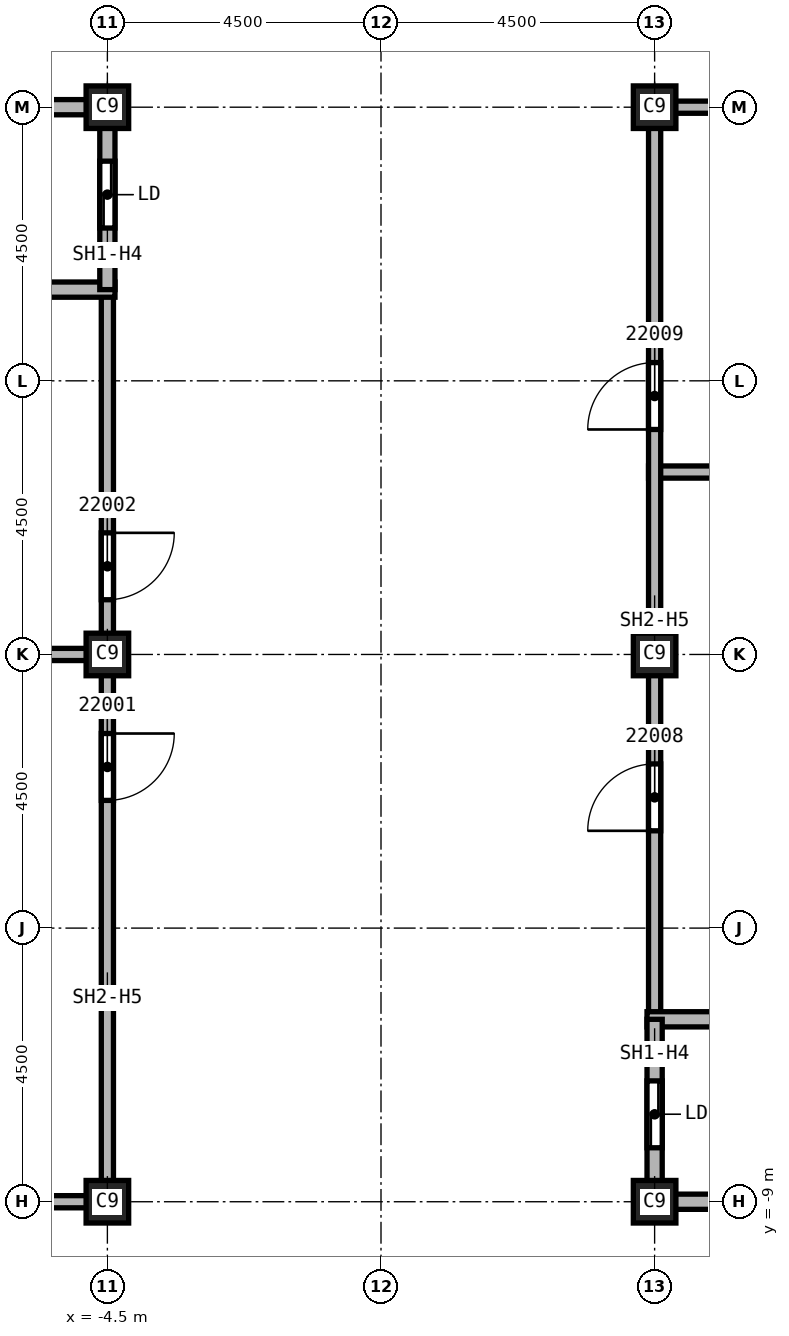
"""IFC4 building model, lengths in metres.
Left out: names, types, materials, properties, quantities, classifications, styles, units other than length and angle.
Written with IfcOpenShell. Run it as: python <this file> out.ifc"""

import sys

from ifc_helpers import new_model, si_unit, direction, frame, frame_2d, origin, origin_2d, place, context, subcontext, project, spatial, rectangle, extrude, element, fill, save


model = new_model("IFC4")
c1 = context("Model", 3, precision=1e-05, world=origin(), true_north=direction((0.0, 1.0)))
c2 = subcontext(c1, "Body", "Model", "MODEL_VIEW")
j1 = project(units=[si_unit("LENGTHUNIT", "METRE"), si_unit("PLANEANGLEUNIT", "RADIAN")], contexts=[c1])
p1 = place(None, origin())
s1 = spatial("IfcSite", under=j1, at=p1, CompositionType="ELEMENT")
p2 = place(p1, origin())
s2 = spatial("IfcBuilding", under=s1, at=p2, CompositionType="ELEMENT")
p3 = place(p2, frame((0.0, 0.0, 316.0)))
s3 = spatial("IfcBuildingStorey", under=s2, at=p3, CompositionType="ELEMENT", Elevation=316.0)
for number, where, z_axis, x_axis in (
    (1, (4.5, 0.0, 0.0), (0.0, 0.0, 1.0), (1.0, 0.0, 0.0)),
    (2, (4.5, 9.0, 0.0), (0.0, 0.0, 1.0), (1.0, 0.0, 0.0)),
    (3, (4.5, -9.0, 0.0), (0.0, 0.0, 1.0), (1.0, 0.0, 0.0)),
    (4, (-4.5, 0.0, 0.0), (0.0, 0.0, 1.0), (1.0, 0.0, 0.0)),
    (5, (-4.5, 9.0, 0.0), (0.0, 0.0, 1.0), (1.0, 0.0, 0.0)),
    (6, (-4.5, -9.0, 0.0), (0.0, 0.0, 1.0), (1.0, 0.0, 0.0)),
):
    element("IfcColumn", number, at=place(p3, frame(where, z_axis=z_axis, x_axis=x_axis)), inside=s3, PredefinedType="COLUMN", context=c2, shape_type="SweptSolid", body=[
        extrude(rectangle(XDim=0.7, YDim=0.7, at=origin_2d()), origin(), (0.0, 0.0, 1.0), 3.59),
    ])
p4 = place(p3, frame((-7.625, 0.0, 0.0), z_axis=(0.0, 0.0, 1.0), x_axis=(1.0, 0.0, 0.0)))
e7 = element("IfcWall", 7, at=p4, inside=s3, PredefinedType="SOLIDWALL", context=c2, shape_type="SweptSolid", body=[
    extrude(rectangle(XDim=3.225, YDim=0.2, at=frame_2d((1.613, 0.0))), origin(), (0.0, 0.0, 1.0), 3.59),
])
p5 = place(p3, frame((-4.5, -9.0, 0.0), z_axis=(0.0, 0.0, 1.0), x_axis=(-1.0, 0.0, 0.0)))
e8 = element("IfcWall", 8, at=p5, inside=s3, PredefinedType="SOLIDWALL", context=c2, shape_type="SweptSolid", body=[
    extrude(rectangle(XDim=3.0, YDim=0.2, at=frame_2d((1.5, 0.0))), origin(), (0.0, 0.0, 1.0), 2.828),
])
p6 = place(p3, frame((-4.5, 6.0, 0.0), z_axis=(0.0, 0.0, 1.0), x_axis=(0.0, -1.0, 0.0)))
e9 = element("IfcWall", 9, at=p6, inside=s3, PredefinedType="SOLIDWALL", context=c2, shape_type="SweptSolid", body=[
    extrude(rectangle(XDim=15.1, YDim=0.2, at=frame_2d((7.55, 0.0))), origin(), (0.0, 0.0, 1.0), 2.828),
])
p7 = place(p6, frame((7.3, 0.0, 0.0)))
e10 = element("IfcOpeningElement", 10, at=p7, cuts=e9, PredefinedType="OPENING", context=c2, shape_type="SweptSolid", body=[
    extrude(rectangle(XDim=1.1, YDim=2.1, at=frame_2d((0.55, 1.05))), frame((0.0, 0.1, 0.0), z_axis=(0.0, -1.0, 0.0), x_axis=(1.0, 0.0, 0.0)), (0.0, 0.0, 1.0), 0.2),
])
p8 = place(p6, frame((4.0, 0.0, 0.0)))
e11 = element("IfcOpeningElement", 11, at=p8, cuts=e9, PredefinedType="OPENING", context=c2, shape_type="SweptSolid", body=[
    extrude(rectangle(XDim=1.1, YDim=2.1, at=frame_2d((0.55, 1.05))), frame((0.0, 0.1, 0.0), z_axis=(0.0, -1.0, 0.0), x_axis=(1.0, 0.0, 0.0)), (0.0, 0.0, 1.0), 0.2),
])
p9 = place(p3, frame((4.4, 3.0, 0.0), z_axis=(0.0, 0.0, 1.0), x_axis=(1.0, 0.0, 0.0)))
e12 = element("IfcWall", 12, at=p9, inside=s3, PredefinedType="SOLIDWALL", context=c2, shape_type="SweptSolid", body=[
    extrude(rectangle(XDim=3.225, YDim=0.2, at=frame_2d((1.613, 0.0))), origin(), (0.0, 0.0, 1.0), 3.59),
])
p10 = place(p3, frame((4.5, -6.0, 0.0), z_axis=(0.0, 0.0, 1.0), x_axis=(0.0, 1.0, 0.0)))
e13 = element("IfcWall", 13, at=p10, inside=s3, PredefinedType="SOLIDWALL", context=c2, shape_type="SweptSolid", body=[
    extrude(rectangle(XDim=15.1, YDim=0.2, at=frame_2d((7.55, 0.0))), origin(), (0.0, 0.0, 1.0), 2.828),
])
p11 = place(p10, frame((3.1, 0.0, 0.0)))
e14 = element("IfcOpeningElement", 14, at=p11, cuts=e13, PredefinedType="OPENING", context=c2, shape_type="SweptSolid", body=[
    extrude(rectangle(XDim=1.1, YDim=2.1, at=frame_2d((0.55, 1.05))), frame((0.0, 0.1, 0.0), z_axis=(0.0, -1.0, 0.0), x_axis=(1.0, 0.0, 0.0)), (0.0, 0.0, 1.0), 0.2),
])
p12 = place(p10, frame((9.7, 0.0, 0.0)))
e15 = element("IfcOpeningElement", 15, at=p12, cuts=e13, PredefinedType="OPENING", context=c2, shape_type="SweptSolid", body=[
    extrude(rectangle(XDim=1.1, YDim=2.1, at=frame_2d((0.55, 1.05))), frame((0.0, 0.1, 0.0), z_axis=(0.0, -1.0, 0.0), x_axis=(1.0, 0.0, 0.0)), (0.0, 0.0, 1.0), 0.2),
])
p13 = place(p3, frame((4.5, 9.0, 0.0), z_axis=(0.0, 0.0, 1.0), x_axis=(1.0, 0.0, 0.0)))
e16 = element("IfcWall", 16, at=p13, inside=s3, PredefinedType="SOLIDWALL", context=c2, shape_type="SweptSolid", body=[
    extrude(rectangle(XDim=3.0, YDim=0.2, at=frame_2d((1.5, 0.0))), origin(), (0.0, 0.0, 1.0), 2.828),
])
p14 = place(p3, frame((-7.625, 6.0, 0.0), z_axis=(0.0, 0.0, 1.0), x_axis=(1.0, 0.0, 0.0)))
e17 = element("IfcWall", 17, at=p14, inside=s3, PredefinedType="SOLIDWALL", context=c2, shape_type="SweptSolid", body=[
    extrude(rectangle(XDim=3.25, YDim=0.25, at=frame_2d((1.625, 0.0))), origin(), (0.0, 0.0, 1.0), 3.59),
])
p15 = place(p3, frame((-7.5, 9.0, 0.0), z_axis=(0.0, 0.0, 1.0), x_axis=(1.0, 0.0, 0.0)))
e18 = element("IfcWall", 18, at=p15, inside=s3, PredefinedType="SOLIDWALL", context=c2, shape_type="SweptSolid", body=[
    extrude(rectangle(XDim=3.0, YDim=0.25, at=frame_2d((1.5, 0.0))), origin(), (0.0, 0.0, 1.0), 2.828),
])
p16 = place(p3, frame((-4.5, 9.125, 0.0), z_axis=(0.0, 0.0, 1.0), x_axis=(0.0, -1.0, 0.0)))
e19 = element("IfcWall", 19, at=p16, inside=s3, PredefinedType="SOLIDWALL", context=c2, shape_type="SweptSolid", body=[
    extrude(rectangle(XDim=3.125, YDim=0.25, at=frame_2d((1.562, 0.0))), origin(), (0.0, 0.0, 1.0), 2.828),
])
p17 = place(p16, frame((1.012, 0.0, 0.0)))
e20 = element("IfcOpeningElement", 20, at=p17, cuts=e19, PredefinedType="OPENING", context=c2, shape_type="SweptSolid", body=[
    extrude(rectangle(XDim=1.1, YDim=2.1, at=frame_2d((0.55, 1.05))), frame((0.0, 0.125, 0.0), z_axis=(0.0, -1.0, 0.0), x_axis=(1.0, 0.0, 0.0)), (0.0, 0.0, 1.0), 0.25),
])
p18 = place(p3, frame((4.375, -6.0, 0.0), z_axis=(0.0, 0.0, 1.0), x_axis=(1.0, 0.0, 0.0)))
e21 = element("IfcWall", 21, at=p18, inside=s3, PredefinedType="SOLIDWALL", context=c2, shape_type="SweptSolid", body=[
    extrude(rectangle(XDim=3.25, YDim=0.25, at=frame_2d((1.625, 0.0))), origin(), (0.0, 0.0, 1.0), 3.59),
])
p19 = place(p3, frame((4.5, -9.125, 0.0), z_axis=(0.0, 0.0, 1.0), x_axis=(0.0, 1.0, 0.0)))
e22 = element("IfcWall", 22, at=p19, inside=s3, PredefinedType="SOLIDWALL", context=c2, shape_type="SweptSolid", body=[
    extrude(rectangle(XDim=3.125, YDim=0.25, at=frame_2d((1.562, 0.0))), origin(), (0.0, 0.0, 1.0), 2.828),
])
p20 = place(p19, frame((1.012, 0.0, 0.0)))
e23 = element("IfcOpeningElement", 23, at=p20, cuts=e22, PredefinedType="OPENING", context=c2, shape_type="SweptSolid", body=[
    extrude(rectangle(XDim=1.1, YDim=2.1, at=frame_2d((0.55, 1.05))), frame((0.0, 0.125, 0.0), z_axis=(0.0, -1.0, 0.0), x_axis=(1.0, 0.0, 0.0)), (0.0, 0.0, 1.0), 0.25),
])
p21 = place(p3, frame((7.5, -9.0, 0.0), z_axis=(0.0, 0.0, 1.0), x_axis=(-1.0, 0.0, 0.0)))
e24 = element("IfcWall", 24, at=p21, inside=s3, PredefinedType="SOLIDWALL", context=c2, shape_type="SweptSolid", body=[
    extrude(rectangle(XDim=3.0, YDim=0.25, at=frame_2d((1.5, 0.0))), origin(), (0.0, 0.0, 1.0), 2.828),
])
p22 = place(p7, origin())
e25 = element("IfcDoor", 25, at=p22, inside=s3, OperationType="SINGLE_SWING_RIGHT", PredefinedType="DOOR", context=c2, shape_type="SweptSolid", body=[
    extrude(rectangle(XDim=1.1, YDim=2.1, at=frame_2d((0.55, 1.05))), frame((0.0, 0.025, 0.0), z_axis=(0.0, -1.0, 0.0), x_axis=(1.0, 0.0, 0.0)), (0.0, 0.0, 1.0), 0.05),
])
fill(e10, e25)
p23 = place(p8, origin())
e26 = element("IfcDoor", 26, at=p23, inside=s3, OperationType="SINGLE_SWING_LEFT", PredefinedType="DOOR", context=c2, shape_type="SweptSolid", body=[
    extrude(rectangle(XDim=1.1, YDim=2.1, at=frame_2d((0.55, 1.05))), frame((0.0, 0.025, 0.0), z_axis=(0.0, -1.0, 0.0), x_axis=(1.0, 0.0, 0.0)), (0.0, 0.0, 1.0), 0.05),
])
fill(e11, e26)
p24 = place(p11, origin())
e27 = element("IfcDoor", 27, at=p24, inside=s3, OperationType="SINGLE_SWING_LEFT", PredefinedType="DOOR", context=c2, shape_type="SweptSolid", body=[
    extrude(rectangle(XDim=1.1, YDim=2.1, at=frame_2d((0.55, 1.05))), frame((0.0, 0.025, 0.0), z_axis=(0.0, -1.0, 0.0), x_axis=(1.0, 0.0, 0.0)), (0.0, 0.0, 1.0), 0.05),
])
fill(e14, e27)
p25 = place(p12, origin())
e28 = element("IfcDoor", 28, at=p25, inside=s3, OperationType="SINGLE_SWING_RIGHT", PredefinedType="DOOR", context=c2, shape_type="SweptSolid", body=[
    extrude(rectangle(XDim=1.1, YDim=2.1, at=frame_2d((0.55, 1.05))), frame((0.0, 0.025, 0.0), z_axis=(0.0, -1.0, 0.0), x_axis=(1.0, 0.0, 0.0)), (0.0, 0.0, 1.0), 0.05),
])
fill(e15, e28)
p26 = place(p17, origin())
e29 = element("IfcDoor", 29, at=p26, inside=s3, OperationType="SLIDING_TO_LEFT", PredefinedType="DOOR", context=c2, shape_type="SweptSolid", body=[
    extrude(rectangle(XDim=1.1, YDim=2.1, at=frame_2d((0.55, 1.05))), frame((0.0, 0.025, 0.0), z_axis=(0.0, -1.0, 0.0), x_axis=(1.0, 0.0, 0.0)), (0.0, 0.0, 1.0), 0.05),
])
fill(e20, e29)
p27 = place(p20, origin())
e30 = element("IfcDoor", 30, at=p27, inside=s3, OperationType="SLIDING_TO_LEFT", PredefinedType="DOOR", context=c2, shape_type="SweptSolid", body=[
    extrude(rectangle(XDim=1.1, YDim=2.1, at=frame_2d((0.55, 1.05))), frame((0.0, 0.025, 0.0), z_axis=(0.0, -1.0, 0.0), x_axis=(1.0, 0.0, 0.0)), (0.0, 0.0, 1.0), 0.05),
])
fill(e23, e30)
save(model, sys.argv[1])
